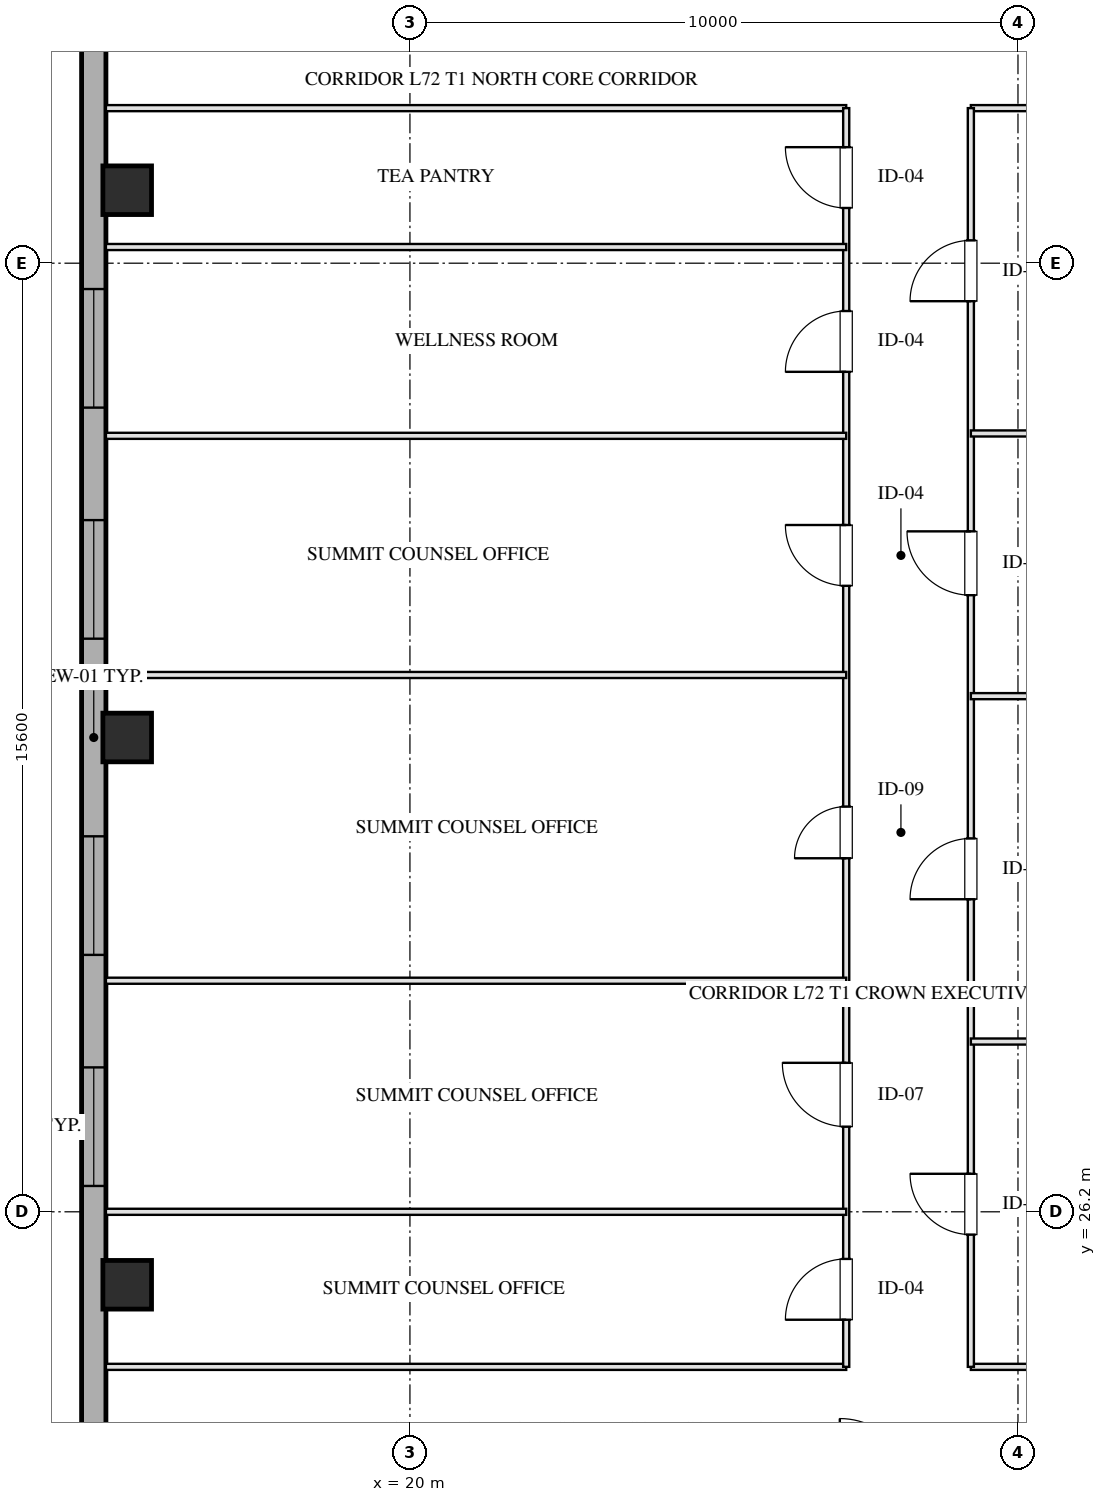
"""IFC4 building model, lengths in metres.
Left out: names, types, materials, properties, quantities, classifications, styles, units other than length and angle.
Written with IfcOpenShell. Run it as: python <this file> out.ifc"""

import sys

from ifc_helpers import new_model, si_unit, direction, frame, frame_2d, origin, origin_2d, place, context, subcontext, project, spatial, rectangle, hollow_rectangle, extrude, element, fill, save


model = new_model("IFC4")
c1 = context("Model", 3, precision=1e-05, world=origin(), true_north=direction((0.0, 1.0)))
c2 = subcontext(c1, "Body", "Model", "MODEL_VIEW")
j1 = project(units=[si_unit("LENGTHUNIT", "METRE"), si_unit("PLANEANGLEUNIT", "RADIAN")], contexts=[c1])
p1 = place(None, origin())
s1 = spatial("IfcSite", under=j1, at=p1, CompositionType="ELEMENT")
p2 = place(p1, origin())
s2 = spatial("IfcBuilding", under=s1, at=p2, CompositionType="ELEMENT")
p3 = place(p2, frame((0.0, 0.0, 263.2)))
s3 = spatial("IfcBuildingStorey", under=s2, at=p3, CompositionType="ELEMENT", Elevation=263.2)
for number, where, z_axis, x_axis in (
    (1, (15.35, 25.0, 0.0), (0.0, 0.0, 1.0), (1.0, 0.0, 0.0)),
    (2, (15.35, 34.0, 0.0), (0.0, 0.0, 1.0), (1.0, 0.0, 0.0)),
    (3, (15.35, 43.0, 0.0), (0.0, 0.0, 1.0), (1.0, 0.0, 0.0)),
):
    element("IfcColumn", number, at=place(p3, frame(where, z_axis=z_axis, x_axis=x_axis)), inside=s3, PredefinedType="COLUMN", context=c2, shape_type="SweptSolid", body=[
        extrude(hollow_rectangle(XDim=0.8, YDim=0.8, WallThickness=0.028, at=origin_2d()), origin(), (0.0, 0.0, 1.0), 3.201),
    ])
p4 = place(p3, frame((14.8, 13.1, 0.0), z_axis=(0.0, 0.0, 1.0), x_axis=(0.0, 1.0, 0.0)))
e4 = element("IfcWall", 4, at=p4, inside=s3, PredefinedType="SOLIDWALL", context=c2, shape_type="SweptSolid", body=[
    extrude(rectangle(XDim=41.8, YDim=0.4, at=frame_2d((20.9, 0.0))), origin(), (0.0, 0.0, 1.0), 2.36),
])
p5 = place(p4, frame((13.525, 0.0, 0.75)))
e5 = element("IfcOpeningElement", 5, at=p5, cuts=e4, PredefinedType="OPENING", context=c2, shape_type="SweptSolid", body=[
    extrude(rectangle(XDim=1.95, YDim=1.21, at=frame_2d((0.975, 0.605))), frame((0.0, 0.21, 0.0), z_axis=(0.0, -1.0, 0.0), x_axis=(1.0, 0.0, 0.0)), (0.0, 0.0, 1.0), 0.42),
])
p6 = place(p4, frame((17.325, 0.0, 0.75)))
e6 = element("IfcOpeningElement", 6, at=p6, cuts=e4, PredefinedType="OPENING", context=c2, shape_type="SweptSolid", body=[
    extrude(rectangle(XDim=1.95, YDim=1.21, at=frame_2d((0.975, 0.605))), frame((0.0, 0.21, 0.0), z_axis=(0.0, -1.0, 0.0), x_axis=(1.0, 0.0, 0.0)), (0.0, 0.0, 1.0), 0.42),
])
p7 = place(p4, frame((22.525, 0.0, 0.75)))
e7 = element("IfcOpeningElement", 7, at=p7, cuts=e4, PredefinedType="OPENING", context=c2, shape_type="SweptSolid", body=[
    extrude(rectangle(XDim=1.95, YDim=1.21, at=frame_2d((0.975, 0.605))), frame((0.0, 0.21, 0.0), z_axis=(0.0, -1.0, 0.0), x_axis=(1.0, 0.0, 0.0)), (0.0, 0.0, 1.0), 0.42),
])
p8 = place(p4, frame((26.325, 0.0, 0.75)))
e8 = element("IfcOpeningElement", 8, at=p8, cuts=e4, PredefinedType="OPENING", context=c2, shape_type="SweptSolid", body=[
    extrude(rectangle(XDim=1.95, YDim=1.21, at=frame_2d((0.975, 0.605))), frame((0.0, 0.21, 0.0), z_axis=(0.0, -1.0, 0.0), x_axis=(1.0, 0.0, 0.0)), (0.0, 0.0, 1.0), 0.42),
])
p9 = place(p3, frame((15.0, 23.65, 0.0), z_axis=(0.0, 0.0, 1.0), x_axis=(1.0, 0.0, 0.0)))
e9 = element("IfcWall", 9, at=p9, inside=s3, PredefinedType="MOVABLE", context=c2, shape_type="SweptSolid", body=[
    extrude(rectangle(XDim=12.175, YDim=0.1, at=frame_2d((6.087, 0.0))), origin(), (0.0, 0.0, 1.0), 2.925),
])
p10 = place(p3, frame((29.225, 23.65, 0.0), z_axis=(0.0, 0.0, 1.0), x_axis=(1.0, 0.0, 0.0)))
e10 = element("IfcWall", 10, at=p10, inside=s3, PredefinedType="MOVABLE", context=c2, shape_type="SweptSolid", body=[
    extrude(rectangle(XDim=15.775, YDim=0.1, at=frame_2d((7.887, 0.0))), origin(), (0.0, 0.0, 1.0), 2.925),
])
p11 = place(p3, frame((15.0, 44.35, 0.0), z_axis=(0.0, 0.0, 1.0), x_axis=(1.0, 0.0, 0.0)))
e11 = element("IfcWall", 11, at=p11, inside=s3, PredefinedType="MOVABLE", context=c2, shape_type="SweptSolid", body=[
    extrude(rectangle(XDim=12.175, YDim=0.1, at=frame_2d((6.087, 0.0))), origin(), (0.0, 0.0, 1.0), 2.925),
])
p12 = place(p3, frame((29.225, 44.35, 0.0), z_axis=(0.0, 0.0, 1.0), x_axis=(1.0, 0.0, 0.0)))
e12 = element("IfcWall", 12, at=p12, inside=s3, PredefinedType="MOVABLE", context=c2, shape_type="SweptSolid", body=[
    extrude(rectangle(XDim=15.775, YDim=0.1, at=frame_2d((7.887, 0.0))), origin(), (0.0, 0.0, 1.0), 2.925),
])
p13 = place(p3, frame((27.175, 23.65, 0.0), z_axis=(0.0, 0.0, 1.0), x_axis=(0.0, 1.0, 0.0)))
e13 = element("IfcWall", 13, at=p13, inside=s3, PredefinedType="MOVABLE", context=c2, shape_type="SweptSolid", body=[
    extrude(rectangle(XDim=20.7, YDim=0.1, at=frame_2d((10.35, 0.0))), origin(), (0.0, 0.0, 1.0), 2.925),
])
p14 = place(p13, frame((0.775, 0.0, 0.0)))
e14 = element("IfcOpeningElement", 14, at=p14, cuts=e13, PredefinedType="OPENING", context=c2, shape_type="SweptSolid", body=[
    extrude(rectangle(XDim=1.0, YDim=2.05, at=frame_2d((0.5, 1.025))), frame((0.0, 0.06, 0.0), z_axis=(0.0, -1.0, 0.0), x_axis=(1.0, 0.0, 0.0)), (0.0, 0.0, 1.0), 0.12),
])
p15 = place(p13, frame((3.95, 0.0, 0.0)))
e15 = element("IfcOpeningElement", 15, at=p15, cuts=e13, PredefinedType="OPENING", context=c2, shape_type="SweptSolid", body=[
    extrude(rectangle(XDim=1.05, YDim=2.05, at=frame_2d((0.525, 1.025))), frame((0.0, 0.06, 0.0), z_axis=(0.0, -1.0, 0.0), x_axis=(1.0, 0.0, 0.0)), (0.0, 0.0, 1.0), 0.12),
])
p16 = place(p13, frame((8.364, 0.0, 0.0)))
e16 = element("IfcOpeningElement", 16, at=p16, cuts=e13, PredefinedType="OPENING", context=c2, shape_type="SweptSolid", body=[
    extrude(rectangle(XDim=0.85, YDim=2.05, at=frame_2d((0.425, 1.025))), frame((0.0, 0.06, 0.0), z_axis=(0.0, -1.0, 0.0), x_axis=(1.0, 0.0, 0.0)), (0.0, 0.0, 1.0), 0.12),
])
p17 = place(p13, frame((12.844, 0.0, 0.0)))
e17 = element("IfcOpeningElement", 17, at=p17, cuts=e13, PredefinedType="OPENING", context=c2, shape_type="SweptSolid", body=[
    extrude(rectangle(XDim=1.0, YDim=2.05, at=frame_2d((0.5, 1.025))), frame((0.0, 0.06, 0.0), z_axis=(0.0, -1.0, 0.0), x_axis=(1.0, 0.0, 0.0)), (0.0, 0.0, 1.0), 0.12),
])
p18 = place(p13, frame((16.364, 0.0, 0.0)))
e18 = element("IfcOpeningElement", 18, at=p18, cuts=e13, PredefinedType="OPENING", context=c2, shape_type="SweptSolid", body=[
    extrude(rectangle(XDim=1.0, YDim=2.05, at=frame_2d((0.5, 1.025))), frame((0.0, 0.06, 0.0), z_axis=(0.0, -1.0, 0.0), x_axis=(1.0, 0.0, 0.0)), (0.0, 0.0, 1.0), 0.12),
])
p19 = place(p13, frame((19.058, 0.0, 0.0)))
e19 = element("IfcOpeningElement", 19, at=p19, cuts=e13, PredefinedType="OPENING", context=c2, shape_type="SweptSolid", body=[
    extrude(rectangle(XDim=1.0, YDim=2.05, at=frame_2d((0.5, 1.025))), frame((0.0, 0.06, 0.0), z_axis=(0.0, -1.0, 0.0), x_axis=(1.0, 0.0, 0.0)), (0.0, 0.0, 1.0), 0.12),
])
p20 = place(p3, frame((29.225, 23.65, 0.0), z_axis=(0.0, 0.0, 1.0), x_axis=(0.0, 1.0, 0.0)))
e20 = element("IfcWall", 20, at=p20, inside=s3, PredefinedType="MOVABLE", context=c2, shape_type="SweptSolid", body=[
    extrude(rectangle(XDim=20.7, YDim=0.1, at=frame_2d((10.35, 0.0))), origin(), (0.0, 0.0, 1.0), 2.925),
])
p21 = place(p20, frame((2.175, 0.0, 0.0)))
e21 = element("IfcOpeningElement", 21, at=p21, cuts=e20, PredefinedType="OPENING", context=c2, shape_type="SweptSolid", body=[
    extrude(rectangle(XDim=1.0, YDim=2.05, at=frame_2d((0.5, 1.025))), frame((0.0, 0.06, 0.0), z_axis=(0.0, -1.0, 0.0), x_axis=(1.0, 0.0, 0.0)), (0.0, 0.0, 1.0), 0.12),
])
p22 = place(p20, frame((7.69, 0.0, 0.0)))
e22 = element("IfcOpeningElement", 22, at=p22, cuts=e20, PredefinedType="OPENING", context=c2, shape_type="SweptSolid", body=[
    extrude(rectangle(XDim=1.0, YDim=2.05, at=frame_2d((0.5, 1.025))), frame((0.0, 0.06, 0.0), z_axis=(0.0, -1.0, 0.0), x_axis=(1.0, 0.0, 0.0)), (0.0, 0.0, 1.0), 0.12),
])
p23 = place(p20, frame((12.69, 0.0, 0.0)))
e23 = element("IfcOpeningElement", 23, at=p23, cuts=e20, PredefinedType="OPENING", context=c2, shape_type="SweptSolid", body=[
    extrude(rectangle(XDim=1.05, YDim=2.05, at=frame_2d((0.525, 1.025))), frame((0.0, 0.06, 0.0), z_axis=(0.0, -1.0, 0.0), x_axis=(1.0, 0.0, 0.0)), (0.0, 0.0, 1.0), 0.12),
])
p24 = place(p20, frame((17.525, 0.0, 0.0)))
e24 = element("IfcOpeningElement", 24, at=p24, cuts=e20, PredefinedType="OPENING", context=c2, shape_type="SweptSolid", body=[
    extrude(rectangle(XDim=1.0, YDim=2.05, at=frame_2d((0.5, 1.025))), frame((0.0, 0.06, 0.0), z_axis=(0.0, -1.0, 0.0), x_axis=(1.0, 0.0, 0.0)), (0.0, 0.0, 1.0), 0.12),
])
for number, where, z_axis, x_axis in (
    (25, (15.0, 26.2, 0.0), (0.0, 0.0, 1.0), (1.0, 0.0, 0.0)),
    (26, (15.0, 30.0, 0.0), (0.0, 0.0, 1.0), (1.0, 0.0, 0.0)),
    (27, (15.0, 35.028, 0.0), (0.0, 0.0, 1.0), (1.0, 0.0, 0.0)),
    (28, (15.0, 38.961, 0.0), (0.0, 0.0, 1.0), (1.0, 0.0, 0.0)),
    (29, (15.0, 42.066, 0.0), (0.0, 0.0, 1.0), (1.0, 0.0, 0.0)),
):
    element("IfcWall", number, at=place(p3, frame(where, z_axis=z_axis, x_axis=x_axis)), inside=s3, PredefinedType="MOVABLE", context=c2, shape_type="SweptSolid", body=[
        extrude(rectangle(XDim=12.175, YDim=0.1, at=frame_2d((6.087, 0.0))), origin(), (0.0, 0.0, 1.0), 2.925),
    ])
for number, where, z_axis, x_axis in (
    (30, (29.225, 29.0, 0.0), (0.0, 0.0, 1.0), (1.0, 0.0, 0.0)),
    (31, (29.225, 34.68, 0.0), (0.0, 0.0, 1.0), (1.0, 0.0, 0.0)),
    (32, (29.225, 39.0, 0.0), (0.0, 0.0, 1.0), (1.0, 0.0, 0.0)),
):
    element("IfcWall", number, at=place(p3, frame(where, z_axis=z_axis, x_axis=x_axis)), inside=s3, PredefinedType="MOVABLE", context=c2, shape_type="SweptSolid", body=[
        extrude(rectangle(XDim=15.775, YDim=0.1, at=frame_2d((7.887, 0.0))), origin(), (0.0, 0.0, 1.0), 2.925),
    ])
p25 = place(p5, origin())
e33 = element("IfcWindow", 33, at=p25, inside=s3, PartitioningType="TRIPLE_PANEL_VERTICAL", PredefinedType="WINDOW", context=c2, shape_type="SweptSolid", body=[
    extrude(rectangle(XDim=1.95, YDim=1.21, at=frame_2d((0.975, 0.605))), frame((0.0, 0.03, 0.0), z_axis=(0.0, -1.0, 0.0), x_axis=(1.0, 0.0, 0.0)), (0.0, 0.0, 1.0), 0.06),
])
fill(e5, e33)
p26 = place(p6, origin())
e34 = element("IfcWindow", 34, at=p26, inside=s3, PartitioningType="TRIPLE_PANEL_VERTICAL", PredefinedType="WINDOW", context=c2, shape_type="SweptSolid", body=[
    extrude(rectangle(XDim=1.95, YDim=1.21, at=frame_2d((0.975, 0.605))), frame((0.0, 0.03, 0.0), z_axis=(0.0, -1.0, 0.0), x_axis=(1.0, 0.0, 0.0)), (0.0, 0.0, 1.0), 0.06),
])
fill(e6, e34)
p27 = place(p7, origin())
e35 = element("IfcWindow", 35, at=p27, inside=s3, PartitioningType="TRIPLE_PANEL_VERTICAL", PredefinedType="WINDOW", context=c2, shape_type="SweptSolid", body=[
    extrude(rectangle(XDim=1.95, YDim=1.21, at=frame_2d((0.975, 0.605))), frame((0.0, 0.03, 0.0), z_axis=(0.0, -1.0, 0.0), x_axis=(1.0, 0.0, 0.0)), (0.0, 0.0, 1.0), 0.06),
])
fill(e7, e35)
p28 = place(p8, origin())
e36 = element("IfcWindow", 36, at=p28, inside=s3, PartitioningType="TRIPLE_PANEL_VERTICAL", PredefinedType="WINDOW", context=c2, shape_type="SweptSolid", body=[
    extrude(rectangle(XDim=1.95, YDim=1.21, at=frame_2d((0.975, 0.605))), frame((0.0, 0.03, 0.0), z_axis=(0.0, -1.0, 0.0), x_axis=(1.0, 0.0, 0.0)), (0.0, 0.0, 1.0), 0.06),
])
fill(e8, e36)
p29 = place(p14, origin())
e37 = element("IfcDoor", 37, at=p29, inside=s3, OperationType="SINGLE_SWING_LEFT", PredefinedType="DOOR", context=c2, shape_type="SweptSolid", body=[
    extrude(rectangle(XDim=1.0, YDim=2.05, at=frame_2d((0.5, 1.025))), frame((0.0, 0.025, 0.0), z_axis=(0.0, -1.0, 0.0), x_axis=(1.0, 0.0, 0.0)), (0.0, 0.0, 1.0), 0.05),
])
fill(e14, e37)
p30 = place(p15, origin())
e38 = element("IfcDoor", 38, at=p30, inside=s3, OperationType="SINGLE_SWING_RIGHT", PredefinedType="DOOR", context=c2, shape_type="SweptSolid", body=[
    extrude(rectangle(XDim=1.05, YDim=2.05, at=frame_2d((0.525, 1.025))), frame((0.0, 0.025, 0.0), z_axis=(0.0, -1.0, 0.0), x_axis=(1.0, 0.0, 0.0)), (0.0, 0.0, 1.0), 0.05),
])
fill(e15, e38)
p31 = place(p16, origin())
e39 = element("IfcDoor", 39, at=p31, inside=s3, OperationType="SINGLE_SWING_LEFT", PredefinedType="DOOR", context=c2, shape_type="SweptSolid", body=[
    extrude(rectangle(XDim=0.85, YDim=2.05, at=frame_2d((0.425, 1.025))), frame((0.0, 0.025, 0.0), z_axis=(0.0, -1.0, 0.0), x_axis=(1.0, 0.0, 0.0)), (0.0, 0.0, 1.0), 0.05),
])
fill(e16, e39)
p32 = place(p17, origin())
e40 = element("IfcDoor", 40, at=p32, inside=s3, OperationType="SINGLE_SWING_RIGHT", PredefinedType="DOOR", context=c2, shape_type="SweptSolid", body=[
    extrude(rectangle(XDim=1.0, YDim=2.05, at=frame_2d((0.5, 1.025))), frame((0.0, 0.025, 0.0), z_axis=(0.0, -1.0, 0.0), x_axis=(1.0, 0.0, 0.0)), (0.0, 0.0, 1.0), 0.05),
])
fill(e17, e40)
p33 = place(p18, origin())
e41 = element("IfcDoor", 41, at=p33, inside=s3, OperationType="SINGLE_SWING_LEFT", PredefinedType="DOOR", context=c2, shape_type="SweptSolid", body=[
    extrude(rectangle(XDim=1.0, YDim=2.05, at=frame_2d((0.5, 1.025))), frame((0.0, 0.025, 0.0), z_axis=(0.0, -1.0, 0.0), x_axis=(1.0, 0.0, 0.0)), (0.0, 0.0, 1.0), 0.05),
])
fill(e18, e41)
p34 = place(p19, origin())
e42 = element("IfcDoor", 42, at=p34, inside=s3, OperationType="SINGLE_SWING_RIGHT", PredefinedType="DOOR", context=c2, shape_type="SweptSolid", body=[
    extrude(rectangle(XDim=1.0, YDim=2.05, at=frame_2d((0.5, 1.025))), frame((0.0, 0.025, 0.0), z_axis=(0.0, -1.0, 0.0), x_axis=(1.0, 0.0, 0.0)), (0.0, 0.0, 1.0), 0.05),
])
fill(e19, e42)
p35 = place(p21, origin())
e43 = element("IfcDoor", 43, at=p35, inside=s3, OperationType="SINGLE_SWING_RIGHT", PredefinedType="DOOR", context=c2, shape_type="SweptSolid", body=[
    extrude(rectangle(XDim=1.0, YDim=2.05, at=frame_2d((0.5, 1.025))), frame((0.0, 0.025, 0.0), z_axis=(0.0, -1.0, 0.0), x_axis=(1.0, 0.0, 0.0)), (0.0, 0.0, 1.0), 0.05),
])
fill(e21, e43)
p36 = place(p22, origin())
e44 = element("IfcDoor", 44, at=p36, inside=s3, OperationType="SINGLE_SWING_LEFT", PredefinedType="DOOR", context=c2, shape_type="SweptSolid", body=[
    extrude(rectangle(XDim=1.0, YDim=2.05, at=frame_2d((0.5, 1.025))), frame((0.0, 0.025, 0.0), z_axis=(0.0, -1.0, 0.0), x_axis=(1.0, 0.0, 0.0)), (0.0, 0.0, 1.0), 0.05),
])
fill(e22, e44)
p37 = place(p23, origin())
e45 = element("IfcDoor", 45, at=p37, inside=s3, OperationType="SINGLE_SWING_RIGHT", PredefinedType="DOOR", context=c2, shape_type="SweptSolid", body=[
    extrude(rectangle(XDim=1.05, YDim=2.05, at=frame_2d((0.525, 1.025))), frame((0.0, 0.025, 0.0), z_axis=(0.0, -1.0, 0.0), x_axis=(1.0, 0.0, 0.0)), (0.0, 0.0, 1.0), 0.05),
])
fill(e23, e45)
p38 = place(p24, origin())
e46 = element("IfcDoor", 46, at=p38, inside=s3, OperationType="SINGLE_SWING_LEFT", PredefinedType="DOOR", context=c2, shape_type="SweptSolid", body=[
    extrude(rectangle(XDim=1.0, YDim=2.05, at=frame_2d((0.5, 1.025))), frame((0.0, 0.025, 0.0), z_axis=(0.0, -1.0, 0.0), x_axis=(1.0, 0.0, 0.0)), (0.0, 0.0, 1.0), 0.05),
])
fill(e24, e46)
save(model, sys.argv[1])
